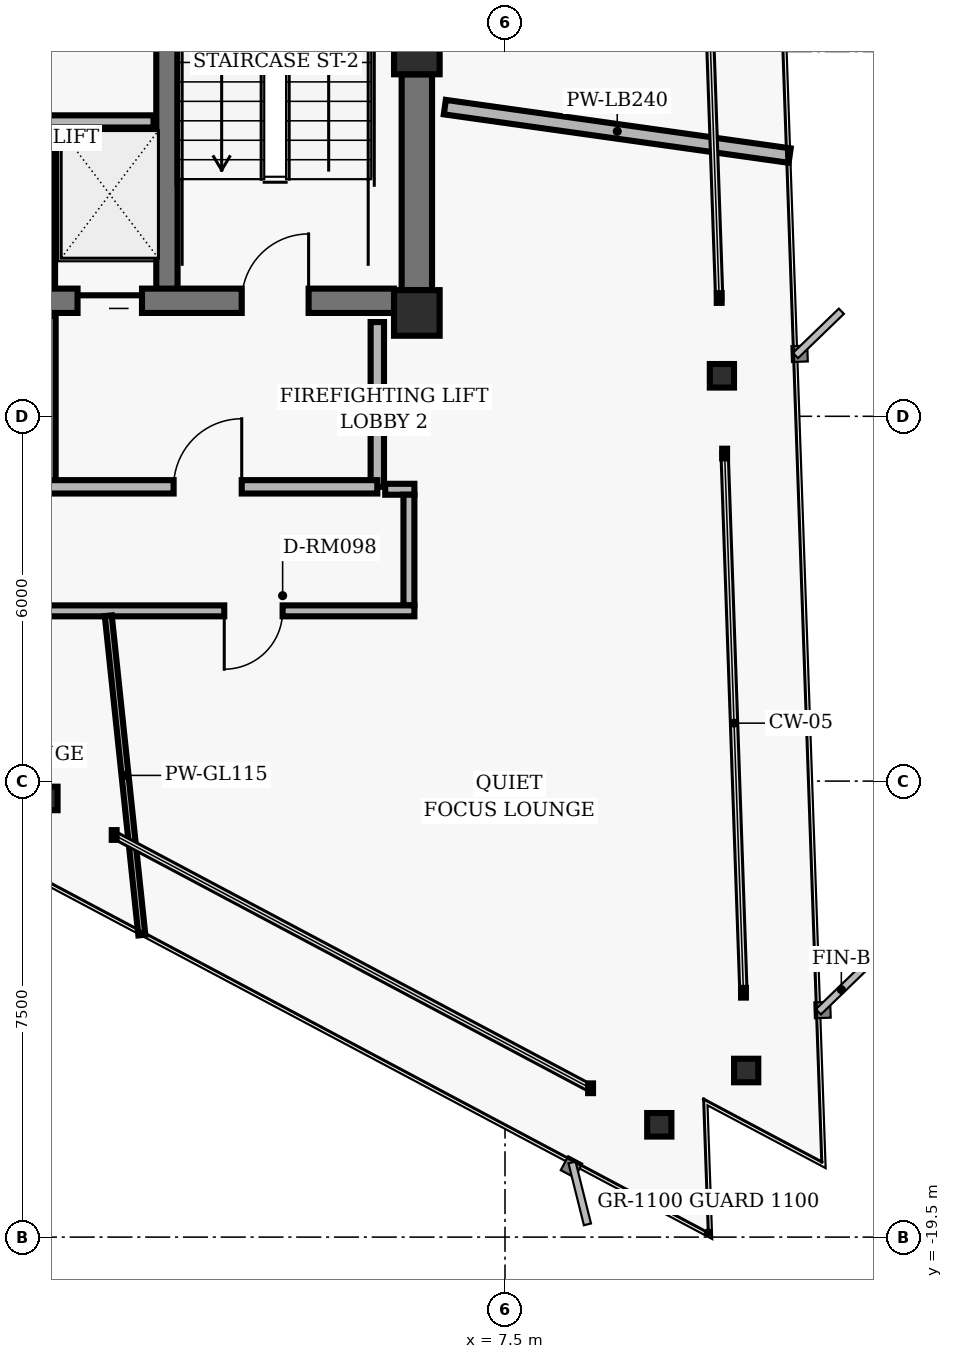
"""IFC4 building model, lengths in metres.
Left out: names, types, materials, properties, quantities, classifications, styles, units other than length and angle.
Written with IfcOpenShell. Run it as: python <this file> out.ifc"""

import sys

from ifc_helpers import new_model, si_unit, direction, frame, frame_2d, origin, origin_2d, place, context, subcontext, project, spatial, rectangle, hollow_rectangle, i_section, extrude, element, fill, save


model = new_model("IFC4")
c1 = context("Model", 3, precision=1e-05, world=origin(), true_north=direction((0.0, 1.0)))
c2 = subcontext(c1, "Body", "Model", "MODEL_VIEW")
j1 = project(units=[si_unit("LENGTHUNIT", "METRE"), si_unit("PLANEANGLEUNIT", "RADIAN")], contexts=[c1])
p1 = place(None, origin())
s1 = spatial("IfcSite", under=j1, at=p1, CompositionType="ELEMENT")
p2 = place(p1, origin())
s2 = spatial("IfcBuilding", under=s1, at=p2, CompositionType="ELEMENT")
p3 = place(p2, frame((0.0, 0.0, 202.72)))
s3 = spatial("IfcBuildingStorey", under=s2, at=p3, CompositionType="ELEMENT", Elevation=202.72)
for number, where, z_axis, x_axis in (
    (1, (6.05, 0.0, 0.0), (0.0, 0.0, 1.0), (1.0, 0.0, 0.0)),
    (2, (6.05, -4.3, 0.0), (0.0, 0.0, 1.0), (1.0, 0.0, 0.0)),
):
    element("IfcColumn", number, at=place(p3, frame(where, z_axis=z_axis, x_axis=x_axis)), inside=s3, PredefinedType="COLUMN", context=c2, shape_type="SweptSolid", body=[
        extrude(hollow_rectangle(XDim=0.75, YDim=0.75, WallThickness=0.05, InnerFilletRadius=0.02, OuterFilletRadius=0.04, at=origin_2d()), origin(), (0.0, 0.0, 1.0), 3.04),
    ])
p4 = place(p3, frame((6.05, -3.925, 0.0), z_axis=(0.0, 0.0, 1.0), x_axis=(0.0, 1.0, 0.0)))
e3 = element("IfcWall", 3, at=p4, inside=s3, PredefinedType="SHEAR", context=c2, shape_type="SweptSolid", body=[
    extrude(rectangle(XDim=3.55, YDim=0.5, at=frame_2d((1.775, 0.0))), origin(), (0.0, 0.0, 1.0), 2.798),
])
p5 = place(p3, frame((1.94, -4.1, 0.0), z_axis=(0.0, 0.0, 1.0), x_axis=(0.0, 1.0, 0.0)))
e4 = element("IfcWall", 4, at=p5, inside=s3, PredefinedType="SHEAR", context=c2, shape_type="SweptSolid", body=[
    extrude(rectangle(XDim=8.2, YDim=0.35, at=frame_2d((4.1, 0.0))), origin(), (0.0, 0.0, 1.0), 2.798),
])
p6 = place(p3, frame((-5.675, -4.1, 0.0), z_axis=(0.0, 0.0, 1.0), x_axis=(1.0, 0.0, 0.0)))
e5 = element("IfcWall", 5, at=p6, inside=s3, PredefinedType="SHEAR", context=c2, shape_type="SweptSolid", body=[
    extrude(rectangle(XDim=11.35, YDim=0.4, at=frame_2d((5.675, 0.0))), origin(), (0.0, 0.0, 1.0), 2.798),
])
p7 = place(p6, frame((1.405, 0.0, 0.0)))
e6 = element("IfcOpeningElement", 6, at=p7, cuts=e5, PredefinedType="OPENING", context=c2, shape_type="SweptSolid", body=[
    extrude(rectangle(XDim=1.1, YDim=2.04, at=frame_2d((0.55, 1.02))), frame((0.0, 0.21, 0.0), z_axis=(0.0, -1.0, 0.0), x_axis=(1.0, 0.0, 0.0)), (0.0, 0.0, 1.0), 0.42),
])
p8 = place(p6, frame((8.845, 0.0, 0.0)))
e7 = element("IfcOpeningElement", 7, at=p8, cuts=e5, PredefinedType="OPENING", context=c2, shape_type="SweptSolid", body=[
    extrude(rectangle(XDim=1.1, YDim=2.04, at=frame_2d((0.55, 1.02))), frame((0.0, 0.21, 0.0), z_axis=(0.0, -1.0, 0.0), x_axis=(1.0, 0.0, 0.0)), (0.0, 0.0, 1.0), 0.42),
])
p9 = place(p6, frame((4.145, 0.0, 0.0)))
e8 = element("IfcOpeningElement", 8, at=p9, cuts=e5, PredefinedType="OPENING", context=c2, shape_type="SweptSolid", body=[
    extrude(rectangle(XDim=1.06, YDim=2.04, at=frame_2d((0.53, 1.02))), frame((0.0, 0.21, 0.0), z_axis=(0.0, -1.0, 0.0), x_axis=(1.0, 0.0, 0.0)), (0.0, 0.0, 1.0), 0.42),
])
p10 = place(p6, frame((6.145, 0.0, 0.0)))
e9 = element("IfcOpeningElement", 9, at=p10, cuts=e5, PredefinedType="OPENING", context=c2, shape_type="SweptSolid", body=[
    extrude(rectangle(XDim=1.06, YDim=2.04, at=frame_2d((0.53, 1.02))), frame((0.0, 0.21, 0.0), z_axis=(0.0, -1.0, 0.0), x_axis=(1.0, 0.0, 0.0)), (0.0, 0.0, 1.0), 0.42),
])
for number, where, z_axis, x_axis in (
    (10, (11.466, -16.76, 0.0), (0.0, 0.0, 1.0), (1.0, 0.0, 0.0)),
    (11, (11.067, -5.334, 0.0), (0.0, 0.0, 1.0), (1.0, 0.0, 0.0)),
    (12, (-0.058, -12.285, 0.0), (0.0, 0.0, 1.0), (1.0, 0.0, 0.0)),
    (13, (10.037, -17.653, 0.0), (0.0, 0.0, 1.0), (1.0, 0.0, 0.0)),
):
    element("IfcColumn", number, at=place(p3, frame(where, z_axis=z_axis, x_axis=x_axis)), inside=s3, PredefinedType="COLUMN", context=c2, shape_type="SweptSolid", body=[
        extrude(i_section(OverallWidth=0.398, OverallDepth=0.387, WebThickness=0.021, FlangeThickness=0.033, FilletRadius=0.018, at=origin_2d()), origin(), (0.0, 0.0, 1.0), 3.04),
    ])
p11 = place(p3, frame((0.0, -3.82, 0.0), z_axis=(0.0, 0.0, 1.0), x_axis=(0.0, 1.0, 0.0)))
e14 = element("IfcWall", 14, at=p11, inside=s3, PredefinedType="PARTITIONING", context=c2, shape_type="SweptSolid", body=[
    extrude(rectangle(XDim=2.67, YDim=0.2, at=frame_2d((1.335, 0.0))), origin(), (0.0, 0.0, 1.0), 2.773),
])
p12 = place(p3, frame((-1.72, -1.15, 0.0), z_axis=(0.0, 0.0, 1.0), x_axis=(1.0, 0.0, 0.0)))
e15 = element("IfcWall", 15, at=p12, inside=s3, PredefinedType="PARTITIONING", context=c2, shape_type="SweptSolid", body=[
    extrude(rectangle(XDim=3.44, YDim=0.2, at=frame_2d((1.72, 0.0))), origin(), (0.0, 0.0, 1.0), 2.773),
])
p13 = place(p3, frame((5.4, -7.16, 0.0), z_axis=(0.0, 0.0, 1.0), x_axis=(0.0, 1.0, 0.0)))
e16 = element("IfcWall", 16, at=p13, inside=s3, PredefinedType="PARTITIONING", context=c2, shape_type="SweptSolid", body=[
    extrude(rectangle(XDim=2.71, YDim=0.22, at=frame_2d((1.355, 0.0))), origin(), (0.0, 0.0, 1.0), 2.773),
])
p14 = place(p3, frame((0.0, -7.16, 0.0), z_axis=(0.0, 0.0, 1.0), x_axis=(0.0, 1.0, 0.0)))
e17 = element("IfcWall", 17, at=p14, inside=s3, PredefinedType="PARTITIONING", context=c2, shape_type="SweptSolid", body=[
    extrude(rectangle(XDim=2.81, YDim=0.22, at=frame_2d((1.405, 0.0))), origin(), (0.0, 0.0, 1.0), 2.773),
])
p15 = place(p3, frame((0.0, -7.16, 0.0), z_axis=(0.0, 0.0, 1.0), x_axis=(1.0, 0.0, 0.0)))
e18 = element("IfcWall", 18, at=p15, inside=s3, PredefinedType="PARTITIONING", context=c2, shape_type="SweptSolid", body=[
    extrude(rectangle(XDim=5.4, YDim=0.22, at=frame_2d((2.7, 0.0))), origin(), (0.0, 0.0, 1.0), 2.773),
])
p16 = place(p15, frame((2.05, 0.0, 0.0)))
e19 = element("IfcOpeningElement", 19, at=p16, cuts=e18, PredefinedType="OPENING", context=c2, shape_type="SweptSolid", body=[
    extrude(rectangle(XDim=1.12, YDim=2.02, at=frame_2d((0.56, 1.01))), frame((0.0, 0.12, 0.0), z_axis=(0.0, -1.0, 0.0), x_axis=(1.0, 0.0, 0.0)), (0.0, 0.0, 1.0), 0.24),
])
p17 = place(p3, frame((5.53, -7.2, 0.0), z_axis=(0.0, 0.0, 1.0), x_axis=(1.0, 0.0, 0.0)))
e20 = element("IfcWall", 20, at=p17, inside=s3, PredefinedType="PARTITIONING", context=c2, shape_type="SweptSolid", body=[
    extrude(rectangle(XDim=0.48, YDim=0.18, at=frame_2d((0.24, 0.0))), origin(), (0.0, 0.0, 1.0), 2.773),
])
p18 = place(p3, frame((5.92, -7.29, 0.0), z_axis=(0.0, 0.0, 1.0), x_axis=(0.0, -1.0, 0.0)))
e21 = element("IfcWall", 21, at=p18, inside=s3, PredefinedType="PARTITIONING", context=c2, shape_type="SweptSolid", body=[
    extrude(rectangle(XDim=1.82, YDim=0.18, at=frame_2d((0.91, 0.0))), origin(), (0.0, 0.0, 1.0), 2.773),
])
p19 = place(p3, frame((6.01, -9.2, 0.0), z_axis=(0.0, 0.0, 1.0), x_axis=(-1.0, 0.0, 0.0)))
e22 = element("IfcWall", 22, at=p19, inside=s3, PredefinedType="PARTITIONING", context=c2, shape_type="SweptSolid", body=[
    extrude(rectangle(XDim=13.3, YDim=0.18, at=frame_2d((6.65, 0.0))), origin(), (0.0, 0.0, 1.0), 2.395),
])
p20 = place(p19, frame((8.557, 0.0, 0.0)))
e23 = element("IfcOpeningElement", 23, at=p20, cuts=e22, PredefinedType="OPENING", context=c2, shape_type="SweptSolid", body=[
    extrude(rectangle(XDim=0.96, YDim=2.02, at=frame_2d((0.48, 1.01))), frame((0.0, 0.1, 0.0), z_axis=(0.0, -1.0, 0.0), x_axis=(1.0, 0.0, 0.0)), (0.0, 0.0, 1.0), 0.2),
])
p21 = place(p19, frame((2.167, 0.0, 0.0)))
e24 = element("IfcOpeningElement", 24, at=p21, cuts=e22, PredefinedType="OPENING", context=c2, shape_type="SweptSolid", body=[
    extrude(rectangle(XDim=0.96, YDim=2.02, at=frame_2d((0.48, 1.01))), frame((0.0, 0.1, 0.0), z_axis=(0.0, -1.0, 0.0), x_axis=(1.0, 0.0, 0.0)), (0.0, 0.0, 1.0), 0.2),
])
p22 = place(p3, frame((0.975, -9.28, 0.0), z_axis=(0.0, 0.0, 1.0), x_axis=(0.104518746602, -0.994522916583, 0.0)))
e25 = element("IfcWall", 25, at=p22, inside=s3, PredefinedType="MOVABLE", context=c2, shape_type="SweptSolid", body=[
    extrude(rectangle(XDim=5.281, YDim=0.115, at=frame_2d((2.641, 0.0))), origin(), (0.0, 0.0, 1.0), 2.773),
])
p23 = place(p3, frame((6.51, -0.915, 0.0), z_axis=(0.0, 0.0, 1.0), x_axis=(0.990267505523, -0.139177108413, 0.0)))
e26 = element("IfcWall", 26, at=p23, inside=s3, PredefinedType="PARTITIONING", context=c2, shape_type="SweptSolid", body=[
    extrude(rectangle(XDim=5.727, YDim=0.24, at=frame_2d((2.864, 0.0))), origin(), (0.0, 0.0, 1.0), 2.773),
])
p24 = place(p8, origin())
e27 = element("IfcDoor", 27, at=p24, inside=s3, OperationType="SINGLE_SWING_RIGHT", PredefinedType="DOOR", context=c2, shape_type="SweptSolid", body=[
    extrude(rectangle(XDim=1.1, YDim=2.04, at=frame_2d((0.55, 1.02))), frame((0.0, 0.025, 0.0), z_axis=(0.0, -1.0, 0.0), x_axis=(1.0, 0.0, 0.0)), (0.0, 0.0, 1.0), 0.05),
])
fill(e7, e27)
p25 = place(p10, origin())
e28 = element("IfcDoor", 28, at=p25, inside=s3, OperationType="SLIDING_TO_RIGHT", PredefinedType="DOOR", context=c2, shape_type="SweptSolid", body=[
    extrude(rectangle(XDim=1.06, YDim=2.04, at=frame_2d((0.53, 1.02))), frame((0.0, 0.025, 0.0), z_axis=(0.0, -1.0, 0.0), x_axis=(1.0, 0.0, 0.0)), (0.0, 0.0, 1.0), 0.05),
])
fill(e9, e28)
p26 = place(p16, origin())
e29 = element("IfcDoor", 29, at=p26, inside=s3, OperationType="SINGLE_SWING_RIGHT", PredefinedType="DOOR", context=c2, shape_type="SweptSolid", body=[
    extrude(rectangle(XDim=1.12, YDim=2.02, at=frame_2d((0.56, 1.01))), frame((0.0, 0.025, 0.0), z_axis=(0.0, -1.0, 0.0), x_axis=(1.0, 0.0, 0.0)), (0.0, 0.0, 1.0), 0.05),
])
fill(e19, e29)
p27 = place(p21, origin())
e30 = element("IfcDoor", 30, at=p27, inside=s3, OperationType="SINGLE_SWING_RIGHT", PredefinedType="DOOR", context=c2, shape_type="SweptSolid", body=[
    extrude(rectangle(XDim=0.96, YDim=2.02, at=frame_2d((0.48, 1.01))), frame((0.0, 0.025, 0.0), z_axis=(0.0, -1.0, 0.0), x_axis=(1.0, 0.0, 0.0)), (0.0, 0.0, 1.0), 0.05),
])
fill(e24, e30)
save(model, sys.argv[1])
